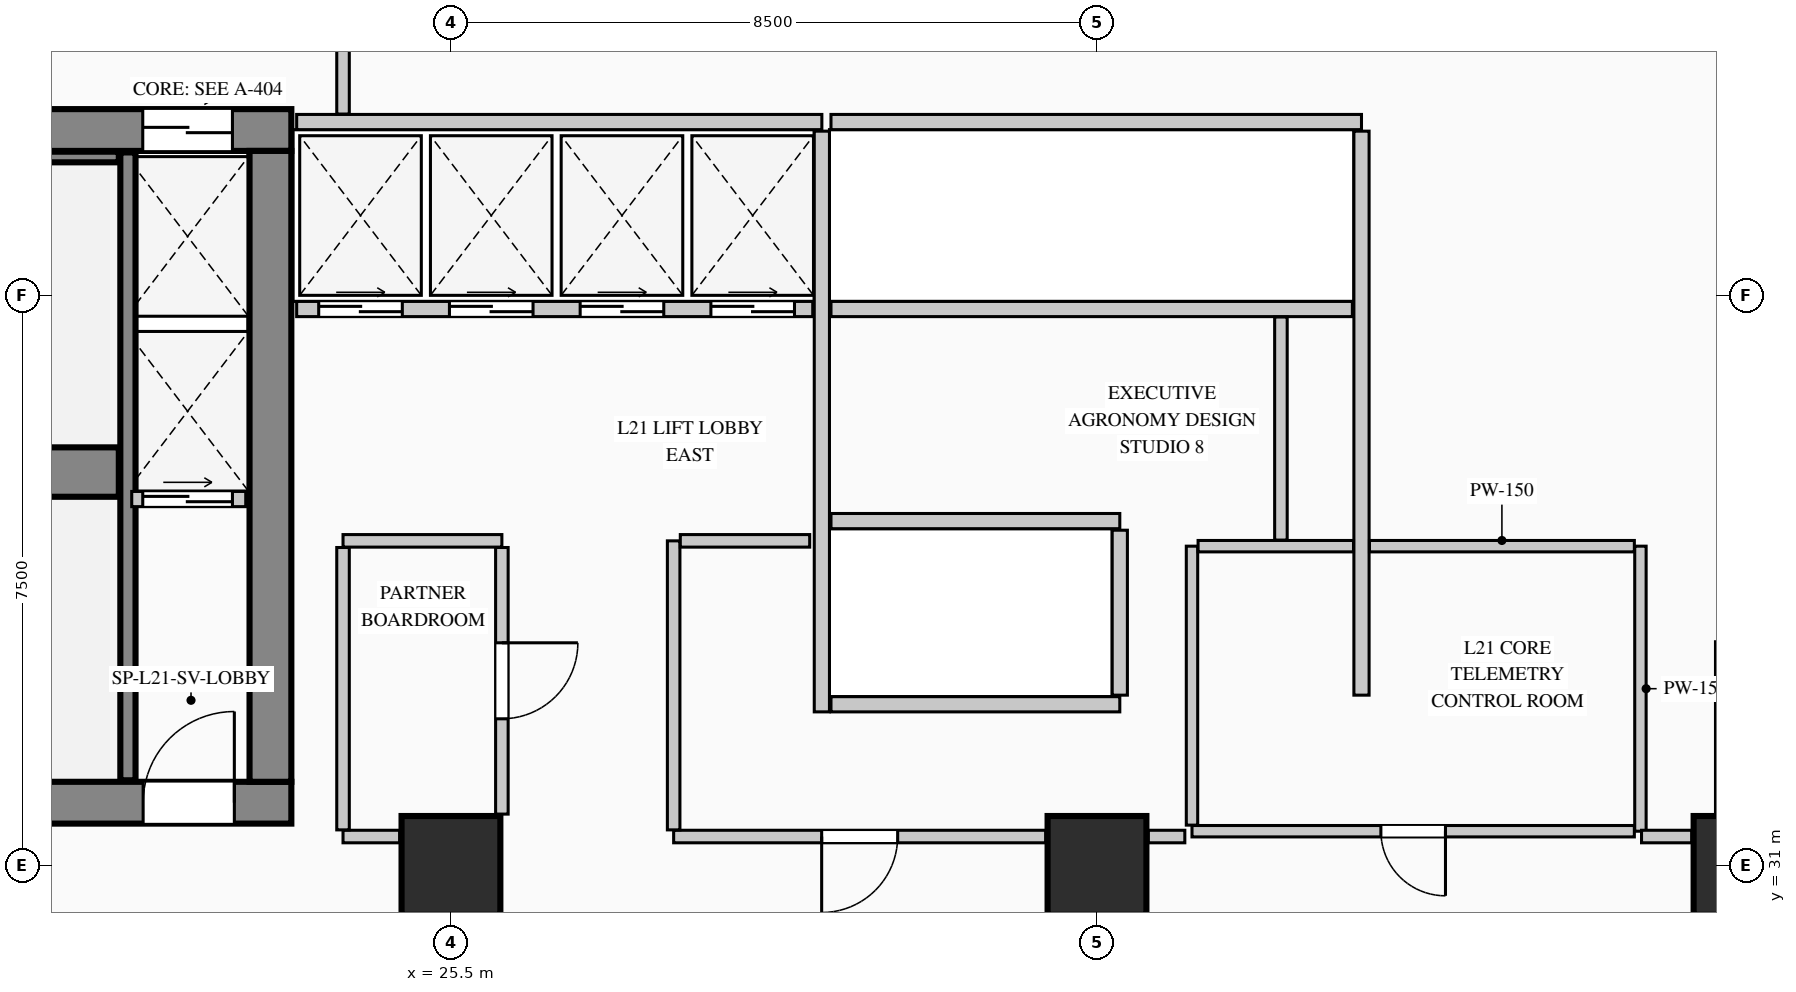
"""IFC4 building model, lengths in metres.
Left out: names, types, materials, properties, quantities, classifications, styles, units other than length and angle.
Written with IfcOpenShell. Run it as: python <this file> out.ifc"""

import sys

from ifc_helpers import new_model, si_unit, direction, frame, frame_2d, origin, origin_2d, place, context, subcontext, project, spatial, rectangle, extrude, element, fill, save


model = new_model("IFC4")
c1 = context("Model", 3, precision=1e-05, world=origin(), true_north=direction((0.0, 1.0)))
c2 = subcontext(c1, "Body", "Model", "MODEL_VIEW")
j1 = project(units=[si_unit("LENGTHUNIT", "METRE"), si_unit("PLANEANGLEUNIT", "RADIAN")], contexts=[c1])
p1 = place(None, origin())
s1 = spatial("IfcSite", under=j1, at=p1, CompositionType="ELEMENT")
p2 = place(p1, origin())
s2 = spatial("IfcBuilding", under=s1, at=p2, CompositionType="ELEMENT")
p3 = place(p2, frame((0.0, 0.0, 93.0)))
s3 = spatial("IfcBuildingStorey", under=s2, at=p3, CompositionType="ELEMENT", Elevation=93.0)
p4 = place(p3, frame((5.45, 40.675, 0.0), z_axis=(0.0, 0.0, 1.0), x_axis=(1.0, 0.0, 0.0)))
e1 = element("IfcWall", 1, at=p4, inside=s3, PredefinedType="SHEAR", context=c2, shape_type="SweptSolid", body=[
    extrude(rectangle(XDim=17.95, YDim=0.55, at=frame_2d((8.975, 0.0))), origin(), (0.0, 0.0, 1.0), 4.4),
])
p5 = place(p4, frame((15.995, 0.0, 0.0)))
e2 = element("IfcOpeningElement", 2, at=p5, cuts=e1, PredefinedType="OPENING", context=c2, shape_type="SweptSolid", body=[
    extrude(rectangle(XDim=1.18, YDim=2.25, at=frame_2d((0.59, 1.125))), frame((0.0, 0.285, 0.0), z_axis=(0.0, -1.0, 0.0), x_axis=(1.0, 0.0, 0.0)), (0.0, 0.0, 1.0), 0.57),
])
p6 = place(p3, frame((5.45, 31.825, 0.0), z_axis=(0.0, 0.0, 1.0), x_axis=(1.0, 0.0, 0.0)))
e3 = element("IfcWall", 3, at=p6, inside=s3, PredefinedType="SHEAR", context=c2, shape_type="SweptSolid", body=[
    extrude(rectangle(XDim=17.95, YDim=0.55, at=frame_2d((8.975, 0.0))), origin(), (0.0, 0.0, 1.0), 4.4),
])
p7 = place(p6, frame((3.2, 0.0, 0.0)))
e4 = element("IfcOpeningElement", 4, at=p7, cuts=e3, PredefinedType="OPENING", context=c2, shape_type="SweptSolid", body=[
    extrude(rectangle(XDim=1.2, YDim=2.2, at=frame_2d((0.6, 1.1))), frame((0.0, 0.285, 0.0), z_axis=(0.0, -1.0, 0.0), x_axis=(1.0, 0.0, 0.0)), (0.0, 0.0, 1.0), 0.57),
])
p8 = place(p6, frame((7.05, 0.0, 0.0)))
e5 = element("IfcOpeningElement", 5, at=p8, cuts=e3, PredefinedType="OPENING", context=c2, shape_type="SweptSolid", body=[
    extrude(rectangle(XDim=1.2, YDim=2.2, at=frame_2d((0.6, 1.1))), frame((0.0, 0.285, 0.0), z_axis=(0.0, -1.0, 0.0), x_axis=(1.0, 0.0, 0.0)), (0.0, 0.0, 1.0), 0.57),
])
p9 = place(p6, frame((8.9, 0.0, 0.0)))
e6 = element("IfcOpeningElement", 6, at=p9, cuts=e3, PredefinedType="OPENING", context=c2, shape_type="SweptSolid", body=[
    extrude(rectangle(XDim=1.15, YDim=2.2, at=frame_2d((0.575, 1.1))), frame((0.0, 0.285, 0.0), z_axis=(0.0, -1.0, 0.0), x_axis=(1.0, 0.0, 0.0)), (0.0, 0.0, 1.0), 0.57),
])
p10 = place(p6, frame((16.0, 0.0, 0.0)))
e7 = element("IfcOpeningElement", 7, at=p10, cuts=e3, PredefinedType="OPENING", context=c2, shape_type="SweptSolid", body=[
    extrude(rectangle(XDim=1.2, YDim=2.2, at=frame_2d((0.6, 1.1))), frame((0.0, 0.285, 0.0), z_axis=(0.0, -1.0, 0.0), x_axis=(1.0, 0.0, 0.0)), (0.0, 0.0, 1.0), 0.57),
])
p11 = place(p3, frame((23.125, 32.1, 0.0), z_axis=(0.0, 0.0, 1.0), x_axis=(0.0, 1.0, 0.0)))
e8 = element("IfcWall", 8, at=p11, inside=s3, PredefinedType="SHEAR", context=c2, shape_type="SweptSolid", body=[
    extrude(rectangle(XDim=8.3, YDim=0.55, at=frame_2d((4.15, 0.0))), origin(), (0.0, 0.0, 1.0), 4.4),
])
p12 = place(p3, frame((14.12, 36.175, 0.0), z_axis=(0.0, 0.0, 1.0), x_axis=(1.0, 0.0, 0.0)))
e9 = element("IfcWall", 9, at=p12, inside=s3, PredefinedType="SHEAR", context=c2, shape_type="SweptSolid", body=[
    extrude(rectangle(XDim=7.01, YDim=0.65, at=frame_2d((3.505, 0.0))), origin(), (0.0, 0.0, 1.0), 4.4),
])
p13 = place(p3, frame((21.25, 32.12, 0.0), z_axis=(0.0, 0.0, 1.0), x_axis=(0.0, 1.0, 0.0)))
e10 = element("IfcWall", 10, at=p13, inside=s3, PredefinedType="SHEAR", context=c2, shape_type="SweptSolid", body=[
    extrude(rectangle(XDim=8.26, YDim=0.2, at=frame_2d((4.13, 0.0))), origin(), (0.0, 0.0, 1.0), 4.4),
])
p14 = place(p3, frame((14.12, 40.32, 0.0), z_axis=(0.0, 0.0, 1.0), x_axis=(1.0, 0.0, 0.0)))
e11 = element("IfcWall", 11, at=p14, inside=s3, PredefinedType="SHEAR", context=c2, shape_type="SweptSolid", body=[
    extrude(rectangle(XDim=7.01, YDim=0.14, at=frame_2d((3.505, 0.0))), origin(), (0.0, 0.0, 1.0), 4.4),
])
for number, where, z_axis, x_axis in (
    (12, (25.5, 31.0, 0.0), (0.0, 0.0, 1.0), (1.0, 0.0, 0.0)),
    (13, (34.0, 31.0, 0.0), (0.0, 0.0, 1.0), (1.0, 0.0, 0.0)),
    (14, (42.5, 31.0, 0.0), (0.0, 0.0, 1.0), (1.0, 0.0, 0.0)),
):
    element("IfcColumn", number, at=place(p3, frame(where, z_axis=z_axis, x_axis=x_axis)), inside=s3, PredefinedType="COLUMN", context=c2, shape_type="SweptSolid", body=[
        extrude(rectangle(XDim=1.3, YDim=1.3, at=origin_2d()), origin(), (0.0, 0.0, 1.0), 4.4),
    ])
p15 = place(p3, frame((21.3, 35.82, 0.0), z_axis=(0.0, 0.0, 1.0), x_axis=(1.0, 0.0, 0.0)))
e15 = element("IfcWall", 15, at=p15, inside=s3, PredefinedType="PARTITIONING", context=c2, shape_type="SweptSolid", body=[
    extrude(rectangle(XDim=1.5, YDim=0.2, at=frame_2d((0.75, 0.0))), origin(), (0.0, 0.0, 1.0), 4.115),
])
p16 = place(p15, frame((0.145, 0.0, 0.0)))
e16 = element("IfcOpeningElement", 16, at=p16, cuts=e15, PredefinedType="OPENING", context=c2, shape_type="SweptSolid", body=[
    extrude(rectangle(XDim=1.18, YDim=2.25, at=frame_2d((0.59, 1.125))), frame((0.0, 0.11, 0.0), z_axis=(0.0, -1.0, 0.0), x_axis=(1.0, 0.0, 0.0)), (0.0, 0.0, 1.0), 0.22),
])
p17 = place(p3, frame((23.47, 40.78, 0.0), z_axis=(0.0, 0.0, 1.0), x_axis=(1.0, 0.0, 0.0)))
e17 = element("IfcWall", 17, at=p17, inside=s3, PredefinedType="PARTITIONING", context=c2, shape_type="SweptSolid", body=[
    extrude(rectangle(XDim=6.91, YDim=0.2, at=frame_2d((3.455, 0.0))), origin(), (0.0, 0.0, 1.0), 4.115),
])
p18 = place(p3, frame((30.38, 33.02, 0.0), z_axis=(0.0, 0.0, 1.0), x_axis=(0.0, 1.0, 0.0)))
e18 = element("IfcWall", 18, at=p18, inside=s3, PredefinedType="PARTITIONING", context=c2, shape_type="SweptSolid", body=[
    extrude(rectangle(XDim=7.64, YDim=0.2, at=frame_2d((3.82, 0.0))), origin(), (0.0, 0.0, 1.0), 4.115),
])
p19 = place(p3, frame((23.47, 38.32, 0.0), z_axis=(0.0, 0.0, 1.0), x_axis=(1.0, 0.0, 0.0)))
e19 = element("IfcWall", 19, at=p19, inside=s3, PredefinedType="PARTITIONING", context=c2, shape_type="SweptSolid", body=[
    extrude(rectangle(XDim=6.79, YDim=0.2, at=frame_2d((3.395, 0.0))), origin(), (0.0, 0.0, 1.0), 4.115),
])
p20 = place(p19, frame((0.29, 0.0, 0.0)))
e20 = element("IfcOpeningElement", 20, at=p20, cuts=e19, PredefinedType="OPENING", context=c2, shape_type="SweptSolid", body=[
    extrude(rectangle(XDim=1.1, YDim=2.2, at=frame_2d((0.55, 1.1))), frame((0.0, 0.11, 0.0), z_axis=(0.0, -1.0, 0.0), x_axis=(1.0, 0.0, 0.0)), (0.0, 0.0, 1.0), 0.22),
])
p21 = place(p19, frame((2.01, 0.0, 0.0)))
e21 = element("IfcOpeningElement", 21, at=p21, cuts=e19, PredefinedType="OPENING", context=c2, shape_type="SweptSolid", body=[
    extrude(rectangle(XDim=1.1, YDim=2.2, at=frame_2d((0.55, 1.1))), frame((0.0, 0.11, 0.0), z_axis=(0.0, -1.0, 0.0), x_axis=(1.0, 0.0, 0.0)), (0.0, 0.0, 1.0), 0.22),
])
p22 = place(p19, frame((3.73, 0.0, 0.0)))
e22 = element("IfcOpeningElement", 22, at=p22, cuts=e19, PredefinedType="OPENING", context=c2, shape_type="SweptSolid", body=[
    extrude(rectangle(XDim=1.1, YDim=2.2, at=frame_2d((0.55, 1.1))), frame((0.0, 0.11, 0.0), z_axis=(0.0, -1.0, 0.0), x_axis=(1.0, 0.0, 0.0)), (0.0, 0.0, 1.0), 0.22),
])
p23 = place(p19, frame((5.45, 0.0, 0.0)))
e23 = element("IfcOpeningElement", 23, at=p23, cuts=e19, PredefinedType="OPENING", context=c2, shape_type="SweptSolid", body=[
    extrude(rectangle(XDim=1.1, YDim=2.2, at=frame_2d((0.55, 1.1))), frame((0.0, 0.11, 0.0), z_axis=(0.0, -1.0, 0.0), x_axis=(1.0, 0.0, 0.0)), (0.0, 0.0, 1.0), 0.22),
])
p24 = place(p3, frame((30.5, 40.78, 0.0), z_axis=(0.0, 0.0, 1.0), x_axis=(1.0, 0.0, 0.0)))
e24 = element("IfcWall", 24, at=p24, inside=s3, PredefinedType="PARTITIONING", context=c2, shape_type="SweptSolid", body=[
    extrude(rectangle(XDim=6.98, YDim=0.2, at=frame_2d((3.49, 0.0))), origin(), (0.0, 0.0, 1.0), 4.115),
])
p25 = place(p3, frame((37.48, 33.24, 0.0), z_axis=(0.0, 0.0, 1.0), x_axis=(0.0, 1.0, 0.0)))
e25 = element("IfcWall", 25, at=p25, inside=s3, PredefinedType="PARTITIONING", context=c2, shape_type="SweptSolid", body=[
    extrude(rectangle(XDim=7.42, YDim=0.2, at=frame_2d((3.71, 0.0))), origin(), (0.0, 0.0, 1.0), 4.115),
])
p26 = place(p3, frame((30.5, 38.32, 0.0), z_axis=(0.0, 0.0, 1.0), x_axis=(1.0, 0.0, 0.0)))
e26 = element("IfcWall", 26, at=p26, inside=s3, PredefinedType="PARTITIONING", context=c2, shape_type="SweptSolid", body=[
    extrude(rectangle(XDim=6.86, YDim=0.2, at=frame_2d((3.43, 0.0))), origin(), (0.0, 0.0, 1.0), 4.115),
])
for number, where, z_axis, x_axis in (
    (27, (30.5, 35.53, 0.0), (0.0, 0.0, 1.0), (1.0, 0.0, 0.0)),
    (28, (30.5, 33.12, 0.0), (0.0, 0.0, 1.0), (1.0, 0.0, 0.0)),
):
    element("IfcWall", number, at=place(p3, frame(where, z_axis=z_axis, x_axis=x_axis)), inside=s3, PredefinedType="PARTITIONING", context=c2, shape_type="SweptSolid", body=[
        extrude(rectangle(XDim=3.8, YDim=0.2, at=frame_2d((1.9, 0.0))), origin(), (0.0, 0.0, 1.0), 4.115),
    ])
p27 = place(p3, frame((34.3, 33.24, 0.0), z_axis=(0.0, 0.0, 1.0), x_axis=(0.0, 1.0, 0.0)))
e29 = element("IfcWall", 29, at=p27, inside=s3, PredefinedType="PARTITIONING", context=c2, shape_type="SweptSolid", body=[
    extrude(rectangle(XDim=2.17, YDim=0.2, at=frame_2d((1.085, 0.0))), origin(), (0.0, 0.0, 1.0), 4.115),
])
p28 = place(p3, frame((41.15, 35.2, 0.0), z_axis=(0.0, 0.0, 1.0), x_axis=(0.0, -1.0, 0.0)))
e30 = element("IfcWall", 30, at=p28, inside=s3, PredefinedType="PARTITIONING", context=c2, shape_type="SweptSolid", body=[
    extrude(rectangle(XDim=3.75, YDim=0.15, at=frame_2d((1.875, 0.0))), origin(), (0.0, 0.0, 1.0), 4.115),
])
p29 = place(p3, frame((41.07, 31.45, 0.0), z_axis=(0.0, 0.0, 1.0), x_axis=(-1.0, 0.0, 0.0)))
e31 = element("IfcWall", 31, at=p29, inside=s3, PredefinedType="PARTITIONING", context=c2, shape_type="SweptSolid", body=[
    extrude(rectangle(XDim=5.82, YDim=0.15, at=frame_2d((2.91, 0.0))), origin(), (0.0, 0.0, 1.0), 4.115),
])
p30 = place(p29, frame((2.485, 0.0, 0.0)))
e32 = element("IfcOpeningElement", 32, at=p30, cuts=e31, PredefinedType="OPENING", context=c2, shape_type="SweptSolid", body=[
    extrude(rectangle(XDim=0.85, YDim=2.1, at=frame_2d((0.425, 1.05))), frame((0.0, 0.085, 0.0), z_axis=(0.0, -1.0, 0.0), x_axis=(1.0, 0.0, 0.0)), (0.0, 0.0, 1.0), 0.17),
])
p31 = place(p3, frame((35.25, 31.53, 0.0), z_axis=(0.0, 0.0, 1.0), x_axis=(0.0, 1.0, 0.0)))
e33 = element("IfcWall", 33, at=p31, inside=s3, PredefinedType="PARTITIONING", context=c2, shape_type="SweptSolid", body=[
    extrude(rectangle(XDim=3.67, YDim=0.15, at=frame_2d((1.835, 0.0))), origin(), (0.0, 0.0, 1.0), 4.115),
])
p32 = place(p3, frame((35.33, 35.2, 0.0), z_axis=(0.0, 0.0, 1.0), x_axis=(1.0, 0.0, 0.0)))
e34 = element("IfcWall", 34, at=p32, inside=s3, PredefinedType="PARTITIONING", context=c2, shape_type="SweptSolid", body=[
    extrude(rectangle(XDim=2.045, YDim=0.15, at=frame_2d((1.022, 0.0))), origin(), (0.0, 0.0, 1.0), 4.115),
])
p33 = place(p3, frame((37.585, 35.2, 0.0), z_axis=(0.0, 0.0, 1.0), x_axis=(1.0, 0.0, 0.0)))
e35 = element("IfcWall", 35, at=p33, inside=s3, PredefinedType="PARTITIONING", context=c2, shape_type="SweptSolid", body=[
    extrude(rectangle(XDim=3.485, YDim=0.15, at=frame_2d((1.743, 0.0))), origin(), (0.0, 0.0, 1.0), 4.115),
])
p34 = place(p3, frame((24.08, 35.27, 0.0), z_axis=(0.0, 0.0, 1.0), x_axis=(1.0, 0.0, 0.0)))
e36 = element("IfcWall", 36, at=p34, inside=s3, PredefinedType="PARTITIONING", context=c2, shape_type="SweptSolid", body=[
    extrude(rectangle(XDim=2.09, YDim=0.165, at=frame_2d((1.045, 0.0))), origin(), (0.0, 0.0, 1.0), 4.115),
])
p35 = place(p3, frame((26.17, 35.183, 0.0), z_axis=(0.0, 0.0, 1.0), x_axis=(0.0, -1.0, 0.0)))
e37 = element("IfcWall", 37, at=p35, inside=s3, PredefinedType="PARTITIONING", context=c2, shape_type="SweptSolid", body=[
    extrude(rectangle(XDim=3.508, YDim=0.165, at=frame_2d((1.754, 0.0))), origin(), (0.0, 0.0, 1.0), 4.115),
])
p36 = place(p35, frame((1.254, 0.0, 0.0)))
e38 = element("IfcOpeningElement", 38, at=p36, cuts=e37, PredefinedType="OPENING", context=c2, shape_type="SweptSolid", body=[
    extrude(rectangle(XDim=1.0, YDim=2.15, at=frame_2d((0.5, 1.075))), frame((0.0, 0.093, 0.0), z_axis=(0.0, -1.0, 0.0), x_axis=(1.0, 0.0, 0.0)), (0.0, 0.0, 1.0), 0.185),
])
p37 = place(p3, frame((24.825, 31.38, 0.0), z_axis=(0.0, 0.0, 1.0), x_axis=(-1.0, 0.0, 0.0)))
e39 = element("IfcWall", 39, at=p37, inside=s3, PredefinedType="PARTITIONING", context=c2, shape_type="SweptSolid", body=[
    extrude(rectangle(XDim=0.745, YDim=0.165, at=frame_2d((0.373, 0.0))), origin(), (0.0, 0.0, 1.0), 4.115),
])
p38 = place(p3, frame((24.08, 31.468, 0.0), z_axis=(0.0, 0.0, 1.0), x_axis=(0.0, 1.0, 0.0)))
e40 = element("IfcWall", 40, at=p38, inside=s3, PredefinedType="PARTITIONING", context=c2, shape_type="SweptSolid", body=[
    extrude(rectangle(XDim=3.715, YDim=0.165, at=frame_2d((1.857, 0.0))), origin(), (0.0, 0.0, 1.0), 4.115),
])
p39 = place(p3, frame((36.42, 38.215, 0.0), z_axis=(0.0, 0.0, 1.0), x_axis=(0.0, -1.0, 0.0)))
e41 = element("IfcWall", 41, at=p39, inside=s3, PredefinedType="PARTITIONING", context=c2, shape_type="SweptSolid", body=[
    extrude(rectangle(XDim=2.935, YDim=0.165, at=frame_2d((1.468, 0.0))), origin(), (0.0, 0.0, 1.0), 4.115),
])
p40 = place(p3, frame((35.156, 31.38, 0.0), z_axis=(0.0, 0.0, 1.0), x_axis=(-1.0, 0.0, 0.0)))
e42 = element("IfcWall", 42, at=p40, inside=s3, PredefinedType="PARTITIONING", context=c2, shape_type="SweptSolid", body=[
    extrude(rectangle(XDim=0.48, YDim=0.165, at=frame_2d((0.24, 0.0))), origin(), (0.0, 0.0, 1.0), 4.115),
])
p41 = place(p3, frame((33.325, 31.38, 0.0), z_axis=(0.0, 0.0, 1.0), x_axis=(-1.0, 0.0, 0.0)))
e43 = element("IfcWall", 43, at=p41, inside=s3, PredefinedType="PARTITIONING", context=c2, shape_type="SweptSolid", body=[
    extrude(rectangle(XDim=4.895, YDim=0.165, at=frame_2d((2.448, 0.0))), origin(), (0.0, 0.0, 1.0), 4.115),
])
p42 = place(p41, frame((1.948, 0.0, 0.0)))
e44 = element("IfcOpeningElement", 44, at=p42, cuts=e43, PredefinedType="OPENING", context=c2, shape_type="SweptSolid", body=[
    extrude(rectangle(XDim=1.0, YDim=2.15, at=frame_2d((0.5, 1.075))), frame((0.0, 0.093, 0.0), z_axis=(0.0, -1.0, 0.0), x_axis=(1.0, 0.0, 0.0)), (0.0, 0.0, 1.0), 0.185),
])
p43 = place(p3, frame((28.43, 31.468, 0.0), z_axis=(0.0, 0.0, 1.0), x_axis=(0.0, 1.0, 0.0)))
e45 = element("IfcWall", 45, at=p43, inside=s3, PredefinedType="PARTITIONING", context=c2, shape_type="SweptSolid", body=[
    extrude(rectangle(XDim=3.802, YDim=0.165, at=frame_2d((1.901, 0.0))), origin(), (0.0, 0.0, 1.0), 4.115),
])
p44 = place(p3, frame((28.518, 35.27, 0.0), z_axis=(0.0, 0.0, 1.0), x_axis=(1.0, 0.0, 0.0)))
e46 = element("IfcWall", 46, at=p44, inside=s3, PredefinedType="PARTITIONING", context=c2, shape_type="SweptSolid", body=[
    extrude(rectangle(XDim=1.702, YDim=0.165, at=frame_2d((0.851, 0.0))), origin(), (0.0, 0.0, 1.0), 4.115),
])
p45 = place(p3, frame((24.08, 40.885, 0.0), z_axis=(0.0, 0.0, 1.0), x_axis=(0.0, 1.0, 0.0)))
e47 = element("IfcWall", 47, at=p45, inside=s3, PredefinedType="PARTITIONING", context=c2, shape_type="SweptSolid", body=[
    extrude(rectangle(XDim=2.33, YDim=0.165, at=frame_2d((1.165, 0.0))), origin(), (0.0, 0.0, 1.0), 4.115),
])
p46 = place(p3, frame((42.22, 33.942, 0.0), z_axis=(0.0, 0.0, 1.0), x_axis=(0.0, -1.0, 0.0)))
e48 = element("IfcWall", 48, at=p46, inside=s3, PredefinedType="PARTITIONING", context=c2, shape_type="SweptSolid", body=[
    extrude(rectangle(XDim=2.267, YDim=0.165, at=frame_2d((1.134, 0.0))), origin(), (0.0, 0.0, 1.0), 4.115),
])
p47 = place(p3, frame((41.825, 31.38, 0.0), z_axis=(0.0, 0.0, 1.0), x_axis=(-1.0, 0.0, 0.0)))
e49 = element("IfcWall", 49, at=p47, inside=s3, PredefinedType="PARTITIONING", context=c2, shape_type="SweptSolid", body=[
    extrude(rectangle(XDim=0.66, YDim=0.165, at=frame_2d((0.33, 0.0))), origin(), (0.0, 0.0, 1.0), 4.115),
])
p48 = place(p10, origin())
e50 = element("IfcDoor", 50, at=p48, inside=s3, OperationType="SINGLE_SWING_RIGHT", PredefinedType="DOOR", context=c2, shape_type="SweptSolid", body=[
    extrude(rectangle(XDim=1.2, YDim=2.2, at=frame_2d((0.6, 1.1))), frame((0.0, 0.025, 0.0), z_axis=(0.0, -1.0, 0.0), x_axis=(1.0, 0.0, 0.0)), (0.0, 0.0, 1.0), 0.05),
])
fill(e7, e50)
p49 = place(p5, origin())
e51 = element("IfcDoor", 51, at=p49, inside=s3, OperationType="DOUBLE_DOOR_SLIDING", PredefinedType="DOOR", context=c2, shape_type="SweptSolid", body=[
    extrude(rectangle(XDim=1.18, YDim=2.25, at=frame_2d((0.59, 1.125))), frame((0.0, 0.025, 0.0), z_axis=(0.0, -1.0, 0.0), x_axis=(1.0, 0.0, 0.0)), (0.0, 0.0, 1.0), 0.05),
])
fill(e2, e51)
p50 = place(p16, origin())
e52 = element("IfcDoor", 52, at=p50, inside=s3, OperationType="DOUBLE_DOOR_SLIDING", PredefinedType="DOOR", context=c2, shape_type="SweptSolid", body=[
    extrude(rectangle(XDim=1.18, YDim=2.25, at=frame_2d((0.59, 1.125))), frame((0.0, 0.025, 0.0), z_axis=(0.0, -1.0, 0.0), x_axis=(1.0, 0.0, 0.0)), (0.0, 0.0, 1.0), 0.05),
])
fill(e16, e52)
p51 = place(p20, origin())
e53 = element("IfcDoor", 53, at=p51, inside=s3, OperationType="DOUBLE_DOOR_SLIDING", PredefinedType="DOOR", context=c2, shape_type="SweptSolid", body=[
    extrude(rectangle(XDim=1.1, YDim=2.2, at=frame_2d((0.55, 1.1))), frame((0.0, 0.025, 0.0), z_axis=(0.0, -1.0, 0.0), x_axis=(1.0, 0.0, 0.0)), (0.0, 0.0, 1.0), 0.05),
])
fill(e20, e53)
p52 = place(p21, origin())
e54 = element("IfcDoor", 54, at=p52, inside=s3, OperationType="DOUBLE_DOOR_SLIDING", PredefinedType="DOOR", context=c2, shape_type="SweptSolid", body=[
    extrude(rectangle(XDim=1.1, YDim=2.2, at=frame_2d((0.55, 1.1))), frame((0.0, 0.025, 0.0), z_axis=(0.0, -1.0, 0.0), x_axis=(1.0, 0.0, 0.0)), (0.0, 0.0, 1.0), 0.05),
])
fill(e21, e54)
p53 = place(p22, origin())
e55 = element("IfcDoor", 55, at=p53, inside=s3, OperationType="DOUBLE_DOOR_SLIDING", PredefinedType="DOOR", context=c2, shape_type="SweptSolid", body=[
    extrude(rectangle(XDim=1.1, YDim=2.2, at=frame_2d((0.55, 1.1))), frame((0.0, 0.025, 0.0), z_axis=(0.0, -1.0, 0.0), x_axis=(1.0, 0.0, 0.0)), (0.0, 0.0, 1.0), 0.05),
])
fill(e22, e55)
p54 = place(p23, origin())
e56 = element("IfcDoor", 56, at=p54, inside=s3, OperationType="DOUBLE_DOOR_SLIDING", PredefinedType="DOOR", context=c2, shape_type="SweptSolid", body=[
    extrude(rectangle(XDim=1.1, YDim=2.2, at=frame_2d((0.55, 1.1))), frame((0.0, 0.025, 0.0), z_axis=(0.0, -1.0, 0.0), x_axis=(1.0, 0.0, 0.0)), (0.0, 0.0, 1.0), 0.05),
])
fill(e23, e56)
p55 = place(p30, origin())
e57 = element("IfcDoor", 57, at=p55, inside=s3, OperationType="SINGLE_SWING_LEFT", PredefinedType="DOOR", context=c2, shape_type="SweptSolid", body=[
    extrude(rectangle(XDim=0.85, YDim=2.1, at=frame_2d((0.425, 1.05))), frame((0.0, 0.025, 0.0), z_axis=(0.0, -1.0, 0.0), x_axis=(1.0, 0.0, 0.0)), (0.0, 0.0, 1.0), 0.05),
])
fill(e32, e57)
p56 = place(p36, origin())
e58 = element("IfcDoor", 58, at=p56, inside=s3, OperationType="SINGLE_SWING_LEFT", PredefinedType="DOOR", context=c2, shape_type="SweptSolid", body=[
    extrude(rectangle(XDim=1.0, YDim=2.15, at=frame_2d((0.5, 1.075))), frame((0.0, 0.025, 0.0), z_axis=(0.0, -1.0, 0.0), x_axis=(1.0, 0.0, 0.0)), (0.0, 0.0, 1.0), 0.05),
])
fill(e38, e58)
p57 = place(p42, origin())
e59 = element("IfcDoor", 59, at=p57, inside=s3, OperationType="SINGLE_SWING_RIGHT", PredefinedType="DOOR", context=c2, shape_type="SweptSolid", body=[
    extrude(rectangle(XDim=1.0, YDim=2.15, at=frame_2d((0.5, 1.075))), frame((0.0, 0.025, 0.0), z_axis=(0.0, -1.0, 0.0), x_axis=(1.0, 0.0, 0.0)), (0.0, 0.0, 1.0), 0.05),
])
fill(e44, e59)
save(model, sys.argv[1])
